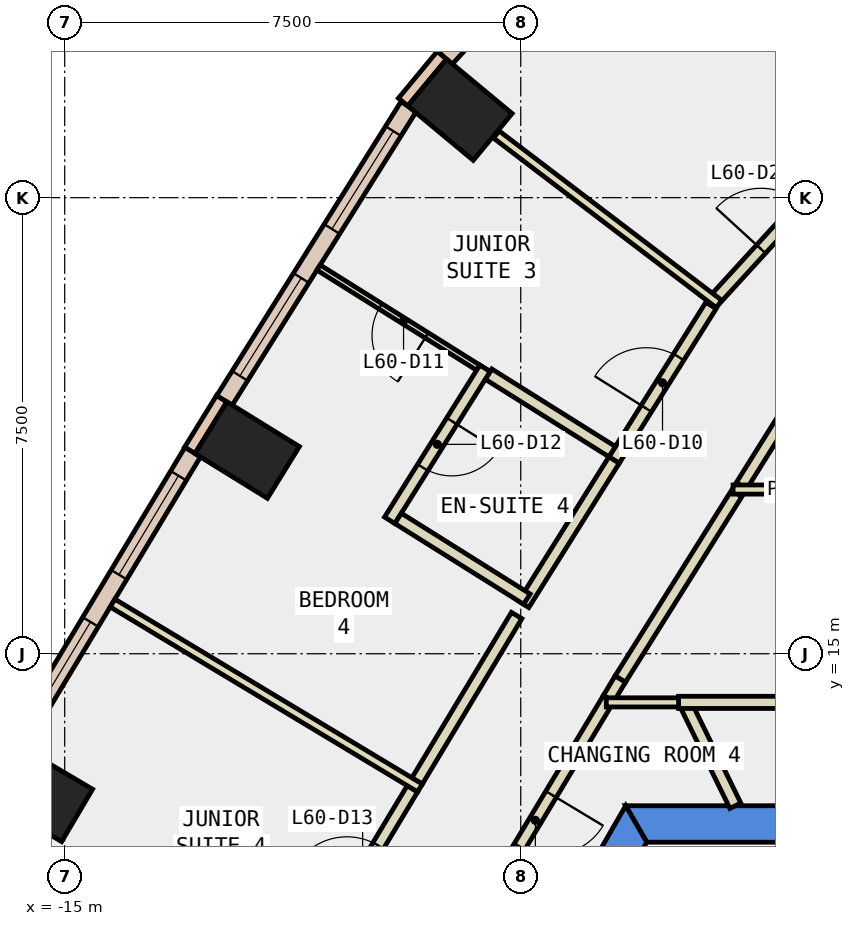
"""IFC4 building model, lengths in metres.
Left out: names, types, materials, properties, quantities, classifications, styles, units other than length and angle.
Written with IfcOpenShell. Run it as: python <this file> out.ifc"""

import sys

from ifc_helpers import new_model, si_unit, direction, frame, frame_2d, origin, origin_2d, place, context, subcontext, project, spatial, polyline, rectangle, outline, extrude, element, fill, save


model = new_model("IFC4")
c1 = context("Model", 3, precision=1e-05, world=origin(), true_north=direction((0.0, 1.0)))
c2 = subcontext(c1, "Body", "Model", "MODEL_VIEW")
j1 = project(units=[si_unit("LENGTHUNIT", "METRE"), si_unit("PLANEANGLEUNIT", "RADIAN")], contexts=[c1])
p1 = place(None, origin())
s1 = spatial("IfcSite", under=j1, at=p1, CompositionType="ELEMENT")
p2 = place(p1, origin())
s2 = spatial("IfcBuilding", under=s1, at=p2, CompositionType="ELEMENT")
p3 = place(p2, frame((0.0, 0.0, 263.0)))
s3 = spatial("IfcBuildingStorey", under=s2, at=p3, CompositionType="ELEMENT", Elevation=263.0)
for number, where, z_axis, x_axis in (
    (1, (-8.5, 23.946, -0.34), (0.0, 0.0, 1.0), (0.639, 0.769, 0.0)),
    (2, (-11.999, 18.349, -0.34), (0.0, 0.0, 1.0), (0.526, 0.851, 0.0)),
    (3, (-15.399, 12.697, -0.34), (0.0, 0.0, 1.0), (0.509, 0.861, 0.0)),
):
    element("IfcColumn", number, at=place(p3, frame(where, z_axis=z_axis, x_axis=x_axis)), inside=s3, PredefinedType="COLUMN", context=c2, shape_type="SweptSolid", body=[
        extrude(rectangle(XDim=1.0, YDim=1.4, at=origin_2d()), origin(), (0.0, 0.0, 1.0), 3.6),
    ])
p4 = place(p3, frame((0.0, 0.0, -0.34)))
e4 = element("IfcWall", 4, at=p4, inside=s3, PredefinedType="SHEAR", context=c2, shape_type="SweptSolid", body=[
    extrude(outline(polyline([(5.774, 12.5), (-5.774, 12.5), (-5.427, 11.9), (5.427, 11.9), (5.774, 12.5)])), origin(), (0.0, 0.0, 1.0), 3.6),
])
p5 = place(p3, frame((0.0, 0.0, -0.34)))
e5 = element("IfcWall", 5, at=p5, inside=s3, PredefinedType="SHEAR", context=c2, shape_type="SweptSolid", body=[
    extrude(outline(polyline([(-10.535, 4.253), (-10.015, 3.953), (-5.427, 11.9), (-5.774, 12.5), (-10.535, 4.253)])), origin(), (0.0, 0.0, 1.0), 3.6),
])
p6 = place(p3, frame((-8.796, 24.842, 0.0), z_axis=(0.0, 0.0, 1.0), x_axis=(-0.638117112481, -0.769939316283, 0.0)))
e6 = element("IfcWall", 6, at=p6, inside=s3, PredefinedType="STANDARD", context=c2, shape_type="SweptSolid", body=[
    extrude(rectangle(XDim=1.0, YDim=0.2, at=frame_2d((0.5, 0.0))), origin(), (0.0, 0.0, 1.0), 3.26),
])
p7 = place(p3, frame((-12.417, 19.195, 0.0), z_axis=(0.0, 0.0, 1.0), x_axis=(-0.525825307325, -0.850592585306, 0.0)))
e7 = element("IfcWall", 7, at=p7, inside=s3, PredefinedType="STANDARD", context=c2, shape_type="SweptSolid", body=[
    extrude(rectangle(XDim=1.0, YDim=0.2, at=frame_2d((0.5, 0.0))), origin(), (0.0, 0.0, 1.0), 3.26),
])
p8 = place(p3, frame((-5.782, 28.025, 0.0), z_axis=(0.0, 0.0, 1.0), x_axis=(-0.675143863554, -0.737686087374, 0.0)))
e8 = element("IfcWall", 8, at=p8, inside=s3, PredefinedType="STANDARD", context=c2, shape_type="SweptSolid", body=[
    extrude(rectangle(XDim=4.38, YDim=0.3, at=frame_2d((2.19, 0.0))), origin(), (0.0, 0.0, 1.0), 3.26),
])
p9 = place(p8, frame((1.49, 0.0, 0.9)))
e9 = element("IfcOpeningElement", 9, at=p9, cuts=e8, PredefinedType="OPENING", context=c2, shape_type="SweptSolid", body=[
    extrude(rectangle(XDim=1.4, YDim=2.0, at=frame_2d((0.7, 1.0))), frame((0.0, 0.16, 0.0), z_axis=(0.0, -1.0, 0.0), x_axis=(1.0, 0.0, 0.0)), (0.0, 0.0, 1.0), 0.32),
])
p10 = place(p3, frame((-9.343, 23.998, 0.0), z_axis=(0.0, 0.0, 1.0), x_axis=(-0.531137483242, -0.847285650708, 0.0)))
e10 = element("IfcWall", 10, at=p10, inside=s3, PredefinedType="STANDARD", context=c2, shape_type="SweptSolid", body=[
    extrude(rectangle(XDim=5.703, YDim=0.3, at=frame_2d((2.852, 0.0))), origin(), (0.0, 0.0, 1.0), 3.26),
])
p11 = place(p10, frame((0.476, 0.0, 0.9)))
e11 = element("IfcOpeningElement", 11, at=p11, cuts=e10, PredefinedType="OPENING", context=c2, shape_type="SweptSolid", body=[
    extrude(rectangle(XDim=1.9, YDim=2.0, at=frame_2d((0.95, 1.0))), frame((0.0, 0.16, 0.0), z_axis=(0.0, -1.0, 0.0), x_axis=(1.0, 0.0, 0.0)), (0.0, 0.0, 1.0), 0.32),
])
p12 = place(p10, frame((3.327, 0.0, 0.9)))
e12 = element("IfcOpeningElement", 12, at=p12, cuts=e10, PredefinedType="OPENING", context=c2, shape_type="SweptSolid", body=[
    extrude(rectangle(XDim=1.9, YDim=2.0, at=frame_2d((0.95, 1.0))), frame((0.0, 0.16, 0.0), z_axis=(0.0, -1.0, 0.0), x_axis=(1.0, 0.0, 0.0)), (0.0, 0.0, 1.0), 0.32),
])
p13 = place(p3, frame((-12.895, 18.316, 0.0), z_axis=(0.0, 0.0, 1.0), x_axis=(-0.515435742129, -0.856928232547, 0.0)))
e13 = element("IfcWall", 13, at=p13, inside=s3, PredefinedType="STANDARD", context=c2, shape_type="SweptSolid", body=[
    extrude(rectangle(XDim=5.613, YDim=0.3, at=frame_2d((2.806, 0.0))), origin(), (0.0, 0.0, 1.0), 3.26),
])
p14 = place(p13, frame((0.453, 0.0, 0.9)))
e14 = element("IfcOpeningElement", 14, at=p14, cuts=e13, PredefinedType="OPENING", context=c2, shape_type="SweptSolid", body=[
    extrude(rectangle(XDim=1.9, YDim=2.0, at=frame_2d((0.95, 1.0))), frame((0.0, 0.16, 0.0), z_axis=(0.0, -1.0, 0.0), x_axis=(1.0, 0.0, 0.0)), (0.0, 0.0, 1.0), 0.32),
])
p15 = place(p13, frame((3.26, 0.0, 0.9)))
e15 = element("IfcOpeningElement", 15, at=p15, cuts=e13, PredefinedType="OPENING", context=c2, shape_type="SweptSolid", body=[
    extrude(rectangle(XDim=1.9, YDim=2.0, at=frame_2d((0.95, 1.0))), frame((0.0, 0.16, 0.0), z_axis=(0.0, -1.0, 0.0), x_axis=(1.0, 0.0, 0.0)), (0.0, 0.0, 1.0), 0.32),
])
p16 = place(p3, frame((-3.97, 12.5, 0.0), z_axis=(0.0, 0.0, 1.0), x_axis=(-0.440355460167, 0.89782351757, 0.0)))
e16 = element("IfcWall", 16, at=p16, inside=s3, PredefinedType="PARTITIONING", context=c2, shape_type="SweptSolid", body=[
    extrude(rectangle(XDim=1.869, YDim=0.2, at=frame_2d((0.935, 0.0))), origin(), (0.0, 0.0, 1.0), 3.26),
])
p17 = place(p3, frame((-6.054, 14.264, 0.0), z_axis=(0.0, 0.0, 1.0), x_axis=(-0.515508653897, -0.856884372455, 0.0)))
e17 = element("IfcWall", 17, at=p17, inside=s3, PredefinedType="PARTITIONING", context=c2, shape_type="SweptSolid", body=[
    extrude(rectangle(XDim=4.677, YDim=0.2, at=frame_2d((2.339, 0.0))), origin(), (0.0, 0.0, 1.0), 3.26),
])
p18 = place(p17, frame((1.839, 0.0, 0.0)))
e18 = element("IfcOpeningElement", 18, at=p18, cuts=e17, PredefinedType="OPENING", context=c2, shape_type="SweptSolid", body=[
    extrude(rectangle(XDim=1.0, YDim=2.1, at=frame_2d((0.5, 1.05))), frame((0.0, 0.11, 0.0), z_axis=(0.0, -1.0, 0.0), x_axis=(1.0, 0.0, 0.0)), (0.0, 0.0, 1.0), 0.22),
])
p19 = place(p3, frame((-4.904, 14.2, 0.0), z_axis=(0.0, 0.0, 1.0), x_axis=(1.0, 0.0, 0.0)))
e19 = element("IfcWall", 19, at=p19, inside=s3, PredefinedType="PARTITIONING", context=c2, shape_type="SweptSolid", body=[
    extrude(rectangle(XDim=4.504, YDim=0.2, at=frame_2d((2.252, 0.0))), origin(), (0.0, 0.0, 1.0), 3.26),
])
p20 = place(p3, frame((-3.948, 17.636, 0.0), z_axis=(0.0, 0.0, 1.0), x_axis=(-0.531380509042, -0.847133256702, 0.0)))
e20 = element("IfcWall", 20, at=p20, inside=s3, PredefinedType="PARTITIONING", context=c2, shape_type="SweptSolid", body=[
    extrude(rectangle(XDim=3.604, YDim=0.2, at=frame_2d((1.802, 0.0))), origin(), (0.0, 0.0, 1.0), 3.26),
])
p21 = place(p3, frame((-5.863, 14.583, 0.0), z_axis=(0.0, 0.0, 1.0), x_axis=(-0.513433271491, -0.858129521533, 0.0)))
e21 = element("IfcWall", 21, at=p21, inside=s3, PredefinedType="PARTITIONING", context=c2, shape_type="SweptSolid", body=[
    extrude(rectangle(XDim=0.372, YDim=0.2, at=frame_2d((0.186, 0.0))), origin(), (0.0, 0.0, 1.0), 3.26),
])
p22 = place(p3, frame((-2.773, 19.511, 0.0), z_axis=(0.0, 0.0, 1.0), x_axis=(-0.531062870102, -0.847332418829, 0.0)))
e22 = element("IfcWall", 22, at=p22, inside=s3, PredefinedType="PARTITIONING", context=c2, shape_type="SweptSolid", body=[
    extrude(rectangle(XDim=2.062, YDim=0.2, at=frame_2d((1.031, 0.0))), origin(), (0.0, 0.0, 1.0), 3.26),
])
p23 = place(p3, frame((-4.335, 20.793, 0.0), z_axis=(0.0, 0.0, 1.0), x_axis=(0.675074517272, 0.737749548377, 0.0)))
e23 = element("IfcWall", 23, at=p23, inside=s3, PredefinedType="PARTITIONING", context=c2, shape_type="SweptSolid", body=[
    extrude(rectangle(XDim=3.334, YDim=0.2, at=frame_2d((1.667, 0.0))), origin(), (0.0, 0.0, 1.0), 3.26),
])
p24 = place(p23, frame((1.167, 0.0, 0.0)))
e24 = element("IfcOpeningElement", 24, at=p24, cuts=e23, PredefinedType="OPENING", context=c2, shape_type="SweptSolid", body=[
    extrude(rectangle(XDim=1.0, YDim=2.1, at=frame_2d((0.5, 1.05))), frame((0.0, 0.11, 0.0), z_axis=(0.0, -1.0, 0.0), x_axis=(1.0, 0.0, 0.0)), (0.0, 0.0, 1.0), 0.22),
])
p25 = place(p3, frame((-5.965, 18.185, 0.0), z_axis=(0.0, 0.0, 1.0), x_axis=(0.531256372055, 0.847211111324, 0.0)))
e25 = element("IfcWall", 25, at=p25, inside=s3, PredefinedType="PARTITIONING", context=c2, shape_type="SweptSolid", body=[
    extrude(rectangle(XDim=3.0, YDim=0.2, at=frame_2d((1.5, 0.0))), origin(), (0.0, 0.0, 1.0), 3.26),
])
p26 = place(p25, frame((1.0, 0.0, 0.0)))
e26 = element("IfcOpeningElement", 26, at=p26, cuts=e25, PredefinedType="OPENING", context=c2, shape_type="SweptSolid", body=[
    extrude(rectangle(XDim=1.0, YDim=2.1, at=frame_2d((0.5, 1.05))), frame((0.0, 0.11, 0.0), z_axis=(0.0, -1.0, 0.0), x_axis=(1.0, 0.0, 0.0)), (0.0, 0.0, 1.0), 0.22),
])
p27 = place(p3, frame((-9.204, 12.908, 0.0), z_axis=(0.0, 0.0, 1.0), x_axis=(0.51556943596, 0.856847802532, 0.0)))
e27 = element("IfcWall", 27, at=p27, inside=s3, PredefinedType="PARTITIONING", context=c2, shape_type="SweptSolid", body=[
    extrude(rectangle(XDim=3.176, YDim=0.2, at=frame_2d((1.588, 0.0))), origin(), (0.0, 0.0, 1.0), 3.26),
])
p28 = place(p3, frame((-7.452, 15.813, 0.0), z_axis=(0.0, 0.0, 1.0), x_axis=(0.531095943551, 0.847311689252, 0.0)))
e28 = element("IfcWall", 28, at=p28, inside=s3, PredefinedType="PARTITIONING", context=c2, shape_type="SweptSolid", body=[
    extrude(rectangle(XDim=2.8, YDim=0.2, at=frame_2d((1.4, 0.0))), origin(), (0.0, 0.0, 1.0), 3.26),
])
p29 = place(p3, frame((-10.919, 10.057, 0.0), z_axis=(0.0, 0.0, 1.0), x_axis=(0.515568955032, 0.856848091908, 0.0)))
e29 = element("IfcWall", 29, at=p29, inside=s3, PredefinedType="PARTITIONING", context=c2, shape_type="SweptSolid", body=[
    extrude(rectangle(XDim=3.177, YDim=0.2, at=frame_2d((1.588, 0.0))), origin(), (0.0, 0.0, 1.0), 3.26),
])
p30 = place(p29, frame((1.088, 0.0, 0.0)))
e30 = element("IfcOpeningElement", 30, at=p30, cuts=e29, PredefinedType="OPENING", context=c2, shape_type="SweptSolid", body=[
    extrude(rectangle(XDim=1.0, YDim=2.1, at=frame_2d((0.5, 1.05))), frame((0.0, 0.11, 0.0), z_axis=(0.0, -1.0, 0.0), x_axis=(1.0, 0.0, 0.0)), (0.0, 0.0, 1.0), 0.22),
])
p31 = place(p3, frame((-4.904, 14.2, 0.0), z_axis=(0.0, 0.0, 1.0), x_axis=(-1.0, 0.0, 0.0)))
e31 = element("IfcWall", 31, at=p31, inside=s3, PredefinedType="PARTITIONING", context=c2, shape_type="SweptSolid", body=[
    extrude(rectangle(XDim=1.189, YDim=0.15, at=frame_2d((0.594, 0.0))), origin(), (0.0, 0.0, 1.0), 3.26),
])
p32 = place(p3, frame((-4.008, 17.7, 0.0), z_axis=(0.0, 0.0, 1.0), x_axis=(1.0, 0.0, 0.0)))
e32 = element("IfcWall", 32, at=p32, inside=s3, PredefinedType="PARTITIONING", context=c2, shape_type="SweptSolid", body=[
    extrude(rectangle(XDim=3.608, YDim=0.15, at=frame_2d((1.804, 0.0))), origin(), (0.0, 0.0, 1.0), 3.26),
])
p33 = place(p3, frame((-4.238, 20.751, 0.0), z_axis=(0.0, 0.0, 1.0), x_axis=(-0.795806473987, 0.605551034976, 0.0)))
e33 = element("IfcWall", 33, at=p33, inside=s3, PredefinedType="PARTITIONING", context=c2, shape_type="SweptSolid", body=[
    extrude(rectangle(XDim=4.604, YDim=0.15, at=frame_2d((2.302, 0.0))), origin(), (0.0, 0.0, 1.0), 3.26),
])
p34 = place(p3, frame((-8.029, 19.598, 0.0), z_axis=(0.0, 0.0, 1.0), x_axis=(-0.847216023371, 0.531248538581, 0.0)))
e34 = element("IfcWall", 34, at=p34, inside=s3, PredefinedType="PARTITIONING", context=c2, shape_type="SweptSolid", body=[
    extrude(rectangle(XDim=3.3, YDim=0.1, at=frame_2d((1.65, 0.0))), origin(), (0.0, 0.0, 1.0), 3.26),
])
p35 = place(p34, frame((1.2, 0.0, 0.0)))
e35 = element("IfcOpeningElement", 35, at=p35, cuts=e34, PredefinedType="OPENING", context=c2, shape_type="SweptSolid", body=[
    extrude(rectangle(XDim=0.9, YDim=2.1, at=frame_2d((0.45, 1.05))), frame((0.0, 0.06, 0.0), z_axis=(0.0, -1.0, 0.0), x_axis=(1.0, 0.0, 0.0)), (0.0, 0.0, 1.0), 0.12),
])
p36 = place(p3, frame((-5.996, 18.323, 0.0), z_axis=(0.0, 0.0, 1.0), x_axis=(-0.847191403331, 0.531287799711, 0.0)))
e36 = element("IfcWall", 36, at=p36, inside=s3, PredefinedType="PARTITIONING", context=c2, shape_type="SweptSolid", body=[
    extrude(rectangle(XDim=2.4, YDim=0.2, at=frame_2d((1.2, 0.0))), origin(), (0.0, 0.0, 1.0), 3.26),
])
p37 = place(p3, frame((-8.088, 19.693, 0.0), z_axis=(0.0, 0.0, 1.0), x_axis=(-0.531277961984, -0.847197572654, 0.0)))
e37 = element("IfcWall", 37, at=p37, inside=s3, PredefinedType="PARTITIONING", context=c2, shape_type="SweptSolid", body=[
    extrude(rectangle(XDim=2.95, YDim=0.2, at=frame_2d((1.475, 0.0))), origin(), (0.0, 0.0, 1.0), 3.26),
])
p38 = place(p37, frame((1.025, 0.0, 0.0)))
e38 = element("IfcOpeningElement", 38, at=p38, cuts=e37, PredefinedType="OPENING", context=c2, shape_type="SweptSolid", body=[
    extrude(rectangle(XDim=0.9, YDim=2.1, at=frame_2d((0.45, 1.05))), frame((0.0, 0.11, 0.0), z_axis=(0.0, -1.0, 0.0), x_axis=(1.0, 0.0, 0.0)), (0.0, 0.0, 1.0), 0.22),
])
p39 = place(p3, frame((-9.517, 17.226, 0.0), z_axis=(0.0, 0.0, 1.0), x_axis=(0.847229363594, -0.53122726348, 0.0)))
e39 = element("IfcWall", 39, at=p39, inside=s3, PredefinedType="PARTITIONING", context=c2, shape_type="SweptSolid", body=[
    extrude(rectangle(XDim=2.5, YDim=0.2, at=frame_2d((1.25, 0.0))), origin(), (0.0, 0.0, 1.0), 3.26),
])
p40 = place(p3, frame((-9.157, 12.792, 0.0), z_axis=(0.0, 0.0, 1.0), x_axis=(-0.856933793276, 0.515426497129, 0.0)))
e40 = element("IfcWall", 40, at=p40, inside=s3, PredefinedType="PARTITIONING", context=c2, shape_type="SweptSolid", body=[
    extrude(rectangle(XDim=5.9, YDim=0.15, at=frame_2d((2.95, 0.0))), origin(), (0.0, 0.0, 1.0), 3.26),
])
p41 = place(p11, origin())
e41 = element("IfcWindow", 41, at=p41, inside=s3, PartitioningType="SINGLE_PANEL", PredefinedType="WINDOW", context=c2, shape_type="SweptSolid", body=[
    extrude(rectangle(XDim=1.9, YDim=2.0, at=frame_2d((0.95, 1.0))), frame((0.0, 0.03, 0.0), z_axis=(0.0, -1.0, 0.0), x_axis=(1.0, 0.0, 0.0)), (0.0, 0.0, 1.0), 0.06),
])
fill(e11, e41)
p42 = place(p12, origin())
e42 = element("IfcWindow", 42, at=p42, inside=s3, PartitioningType="SINGLE_PANEL", PredefinedType="WINDOW", context=c2, shape_type="SweptSolid", body=[
    extrude(rectangle(XDim=1.9, YDim=2.0, at=frame_2d((0.95, 1.0))), frame((0.0, 0.03, 0.0), z_axis=(0.0, -1.0, 0.0), x_axis=(1.0, 0.0, 0.0)), (0.0, 0.0, 1.0), 0.06),
])
fill(e12, e42)
p43 = place(p14, origin())
e43 = element("IfcWindow", 43, at=p43, inside=s3, PartitioningType="SINGLE_PANEL", PredefinedType="WINDOW", context=c2, shape_type="SweptSolid", body=[
    extrude(rectangle(XDim=1.9, YDim=2.0, at=frame_2d((0.95, 1.0))), frame((0.0, 0.03, 0.0), z_axis=(0.0, -1.0, 0.0), x_axis=(1.0, 0.0, 0.0)), (0.0, 0.0, 1.0), 0.06),
])
fill(e14, e43)
p44 = place(p15, origin())
e44 = element("IfcWindow", 44, at=p44, inside=s3, PartitioningType="SINGLE_PANEL", PredefinedType="WINDOW", context=c2, shape_type="SweptSolid", body=[
    extrude(rectangle(XDim=1.9, YDim=2.0, at=frame_2d((0.95, 1.0))), frame((0.0, 0.03, 0.0), z_axis=(0.0, -1.0, 0.0), x_axis=(1.0, 0.0, 0.0)), (0.0, 0.0, 1.0), 0.06),
])
fill(e15, e44)
p45 = place(p26, origin())
e45 = element("IfcDoor", 45, at=p45, inside=s3, OperationType="SINGLE_SWING_LEFT", PredefinedType="DOOR", context=c2, shape_type="SweptSolid", body=[
    extrude(rectangle(XDim=1.0, YDim=2.1, at=frame_2d((0.5, 1.05))), frame((0.0, 0.025, 0.0), z_axis=(0.0, -1.0, 0.0), x_axis=(1.0, 0.0, 0.0)), (0.0, 0.0, 1.0), 0.05),
])
fill(e26, e45)
p46 = place(p35, origin())
e46 = element("IfcDoor", 46, at=p46, inside=s3, OperationType="SINGLE_SWING_RIGHT", PredefinedType="DOOR", context=c2, shape_type="SweptSolid", body=[
    extrude(rectangle(XDim=0.9, YDim=2.1, at=frame_2d((0.45, 1.05))), frame((0.0, 0.025, 0.0), z_axis=(0.0, -1.0, 0.0), x_axis=(1.0, 0.0, 0.0)), (0.0, 0.0, 1.0), 0.05),
])
fill(e35, e46)
p47 = place(p38, origin())
e47 = element("IfcDoor", 47, at=p47, inside=s3, OperationType="SINGLE_SWING_LEFT", PredefinedType="DOOR", context=c2, shape_type="SweptSolid", body=[
    extrude(rectangle(XDim=0.9, YDim=2.1, at=frame_2d((0.45, 1.05))), frame((0.0, 0.025, 0.0), z_axis=(0.0, -1.0, 0.0), x_axis=(1.0, 0.0, 0.0)), (0.0, 0.0, 1.0), 0.05),
])
fill(e38, e47)
p48 = place(p30, origin())
e48 = element("IfcDoor", 48, at=p48, inside=s3, OperationType="SINGLE_SWING_LEFT", PredefinedType="DOOR", context=c2, shape_type="SweptSolid", body=[
    extrude(rectangle(XDim=1.0, YDim=2.1, at=frame_2d((0.5, 1.05))), frame((0.0, 0.025, 0.0), z_axis=(0.0, -1.0, 0.0), x_axis=(1.0, 0.0, 0.0)), (0.0, 0.0, 1.0), 0.05),
])
fill(e30, e48)
p49 = place(p24, origin())
e49 = element("IfcDoor", 49, at=p49, inside=s3, OperationType="SINGLE_SWING_LEFT", PredefinedType="DOOR", context=c2, shape_type="SweptSolid", body=[
    extrude(rectangle(XDim=1.0, YDim=2.1, at=frame_2d((0.5, 1.05))), frame((0.0, 0.025, 0.0), z_axis=(0.0, -1.0, 0.0), x_axis=(1.0, 0.0, 0.0)), (0.0, 0.0, 1.0), 0.05),
])
fill(e24, e49)
p50 = place(p18, origin())
e50 = element("IfcDoor", 50, at=p50, inside=s3, OperationType="SINGLE_SWING_LEFT", PredefinedType="DOOR", context=c2, shape_type="SweptSolid", body=[
    extrude(rectangle(XDim=1.0, YDim=2.1, at=frame_2d((0.5, 1.05))), frame((0.0, 0.025, 0.0), z_axis=(0.0, -1.0, 0.0), x_axis=(1.0, 0.0, 0.0)), (0.0, 0.0, 1.0), 0.05),
])
fill(e18, e50)
save(model, sys.argv[1])
